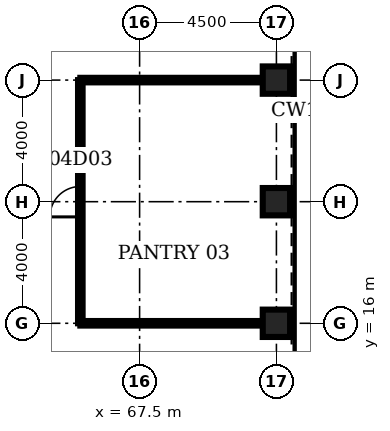
"""IFC4 building model, lengths in metres.
Left out: names, types, materials, properties, quantities, classifications, styles, units other than length and angle.
Written with IfcOpenShell. Run it as: python <this file> out.ifc"""

import sys

from ifc_helpers import new_model, si_unit, direction, frame, frame_2d, origin, origin_2d, place, context, subcontext, project, spatial, rectangle, hollow_rectangle, extrude, element, fill, save


model = new_model("IFC4")
c1 = context("Model", 3, precision=1e-05, world=origin(), true_north=direction((0.0, 1.0)))
c2 = subcontext(c1, "Body", "Model", "MODEL_VIEW")
j1 = project(units=[si_unit("LENGTHUNIT", "METRE"), si_unit("PLANEANGLEUNIT", "RADIAN")], contexts=[c1])
p1 = place(None, origin())
s1 = spatial("IfcSite", under=j1, at=p1, CompositionType="ELEMENT")
p2 = place(p1, origin())
s2 = spatial("IfcBuilding", under=s1, at=p2, CompositionType="ELEMENT")
p3 = place(p2, frame((0.0, 0.0, 23.0)))
s3 = spatial("IfcBuildingStorey", under=s2, at=p3, CompositionType="ELEMENT", Elevation=23.0)
for number, where, z_axis, x_axis in (
    (1, (72.0, 16.0, 0.0), (0.0, 0.0, 1.0), (1.0, 0.0, 0.0)),
    (2, (72.0, 20.0, 0.0), (0.0, 0.0, 1.0), (1.0, 0.0, 0.0)),
    (3, (72.0, 24.0, 0.0), (0.0, 0.0, 1.0), (1.0, 0.0, 0.0)),
):
    element("IfcColumn", number, at=place(p3, frame(where, z_axis=z_axis, x_axis=x_axis)), inside=s3, PredefinedType="COLUMN", context=c2, shape_type="SweptSolid", body=[
        extrude(hollow_rectangle(XDim=0.9, YDim=0.9, WallThickness=0.12, at=origin_2d()), origin(), (0.0, 0.0, 1.0), 4.5),
    ])
for number, where, z_axis, x_axis in (
    (4, (65.55, 16.0, 0.0), (0.0, 0.0, 1.0), (1.0, 0.0, 0.0)),
    (5, (65.55, 24.0, 0.0), (0.0, 0.0, 1.0), (1.0, 0.0, 0.0)),
):
    element("IfcWall", number, at=place(p3, frame(where, z_axis=z_axis, x_axis=x_axis)), inside=s3, PredefinedType="PARTITIONING", context=c2, shape_type="SweptSolid", body=[
        extrude(rectangle(XDim=6.0, YDim=0.15, at=frame_2d((3.0, 0.0))), origin(), (0.0, 0.0, 1.0), 3.0),
    ])
p4 = place(p3, frame((65.55, 16.0, 0.0), z_axis=(0.0, 0.0, 1.0), x_axis=(0.0, 1.0, 0.0)))
e6 = element("IfcWall", 6, at=p4, inside=s3, PredefinedType="PARTITIONING", context=c2, shape_type="SweptSolid", body=[
    extrude(rectangle(XDim=8.0, YDim=0.15, at=frame_2d((4.0, 0.0))), origin(), (0.0, 0.0, 1.0), 3.0),
])
p5 = place(p4, frame((3.5, 0.0, 0.0)))
e7 = element("IfcOpeningElement", 7, at=p5, cuts=e6, PredefinedType="OPENING", context=c2, shape_type="SweptSolid", body=[
    extrude(rectangle(XDim=1.0, YDim=2.1, at=frame_2d((0.5, 1.05))), frame((0.0, 0.085, 0.0), z_axis=(0.0, -1.0, 0.0), x_axis=(1.0, 0.0, 0.0)), (0.0, 0.0, 1.0), 0.17),
])
p6 = place(p5, origin())
e8 = element("IfcDoor", 8, at=p6, inside=s3, OperationType="SINGLE_SWING_LEFT", PredefinedType="DOOR", context=c2, shape_type="SweptSolid", body=[
    extrude(rectangle(XDim=1.0, YDim=2.1, at=frame_2d((0.5, 1.05))), frame((0.0, 0.025, 0.0), z_axis=(0.0, -1.0, 0.0), x_axis=(1.0, 0.0, 0.0)), (0.0, 0.0, 1.0), 0.05),
])
fill(e7, e8)
save(model, sys.argv[1])
